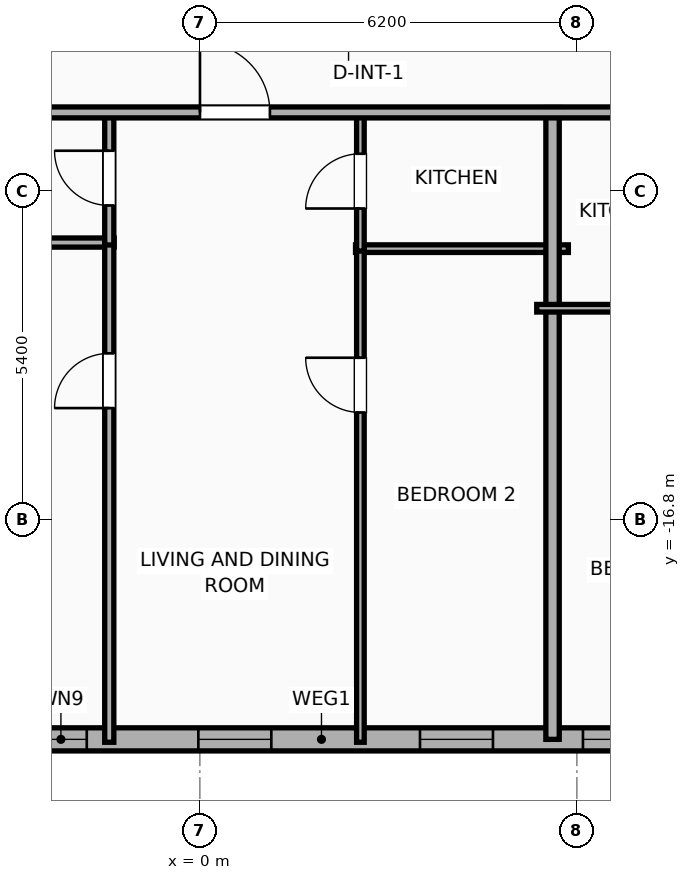
"""IFC4 building model, lengths in metres.
Left out: names, types, materials, properties, quantities, classifications, styles, units other than length and angle.
Written with IfcOpenShell. Run it as: python <this file> out.ifc"""

import sys

from ifc_helpers import new_model, si_unit, direction, frame, frame_2d, origin, place, context, subcontext, project, spatial, rectangle, extrude, element, fill, save


model = new_model("IFC4")
c1 = context("Model", 3, precision=1e-05, world=origin(), true_north=direction((0.0, 1.0)))
c2 = subcontext(c1, "Body", "Model", "MODEL_VIEW")
j1 = project(units=[si_unit("LENGTHUNIT", "METRE"), si_unit("PLANEANGLEUNIT", "RADIAN")], contexts=[c1])
p1 = place(None, origin())
s1 = spatial("IfcSite", under=j1, at=p1, CompositionType="ELEMENT")
p2 = place(p1, origin())
s2 = spatial("IfcBuilding", under=s1, at=p2, CompositionType="ELEMENT")
p3 = place(p2, frame((0.0, 0.0, 105.3)))
s3 = spatial("IfcBuildingStorey", under=s2, at=p3, CompositionType="ELEMENT", Elevation=105.3)
p4 = place(p3, frame((29.381, -20.41, 0.0), z_axis=(0.0, 0.0, 1.0), x_axis=(-1.0, 0.0, 0.0)))
e1 = element("IfcWall", 1, at=p4, inside=s3, PredefinedType="ELEMENTEDWALL", context=c2, shape_type="SweptSolid", body=[
    extrude(rectangle(XDim=54.763, YDim=0.38, at=frame_2d((27.381, 0.0))), origin(), (0.0, 0.0, 1.0), 3.65),
])
p5 = place(p4, frame((6.495, 0.0, 0.75)))
e2 = element("IfcOpeningElement", 2, at=p5, cuts=e1, PredefinedType="OPENING", context=c2, shape_type="SweptSolid", body=[
    extrude(rectangle(XDim=2.4, YDim=2.1, at=frame_2d((1.2, 1.05))), frame((0.0, 0.2, 0.0), z_axis=(0.0, -1.0, 0.0), x_axis=(1.0, 0.0, 0.0)), (0.0, 0.0, 1.0), 0.4),
])
p6 = place(p4, frame((17.686, 0.0, 0.75)))
e3 = element("IfcOpeningElement", 3, at=p6, cuts=e1, PredefinedType="OPENING", context=c2, shape_type="SweptSolid", body=[
    extrude(rectangle(XDim=2.4, YDim=2.1, at=frame_2d((1.2, 1.05))), frame((0.0, 0.2, 0.0), z_axis=(0.0, -1.0, 0.0), x_axis=(1.0, 0.0, 0.0)), (0.0, 0.0, 1.0), 0.4),
])
p7 = place(p4, frame((34.677, 0.0, 0.75)))
e4 = element("IfcOpeningElement", 4, at=p7, cuts=e1, PredefinedType="OPENING", context=c2, shape_type="SweptSolid", body=[
    extrude(rectangle(XDim=2.4, YDim=2.1, at=frame_2d((1.2, 1.05))), frame((0.0, 0.2, 0.0), z_axis=(0.0, -1.0, 0.0), x_axis=(1.0, 0.0, 0.0)), (0.0, 0.0, 1.0), 0.4),
])
p8 = place(p4, frame((45.867, 0.0, 0.75)))
e5 = element("IfcOpeningElement", 5, at=p8, cuts=e1, PredefinedType="OPENING", context=c2, shape_type="SweptSolid", body=[
    extrude(rectangle(XDim=2.4, YDim=2.1, at=frame_2d((1.2, 1.05))), frame((0.0, 0.2, 0.0), z_axis=(0.0, -1.0, 0.0), x_axis=(1.0, 0.0, 0.0)), (0.0, 0.0, 1.0), 0.4),
])
p9 = place(p4, frame((52.281, 0.0, 0.75)))
e6 = element("IfcOpeningElement", 6, at=p9, cuts=e1, PredefinedType="OPENING", context=c2, shape_type="SweptSolid", body=[
    extrude(rectangle(XDim=1.2, YDim=2.05, at=frame_2d((0.6, 1.025))), frame((0.0, 0.2, 0.0), z_axis=(0.0, -1.0, 0.0), x_axis=(1.0, 0.0, 0.0)), (0.0, 0.0, 1.0), 0.4),
])
p10 = place(p4, frame((49.641, 0.0, 0.75)))
e7 = element("IfcOpeningElement", 7, at=p10, cuts=e1, PredefinedType="OPENING", context=c2, shape_type="SweptSolid", body=[
    extrude(rectangle(XDim=1.2, YDim=2.05, at=frame_2d((0.6, 1.025))), frame((0.0, 0.2, 0.0), z_axis=(0.0, -1.0, 0.0), x_axis=(1.0, 0.0, 0.0)), (0.0, 0.0, 1.0), 0.4),
])
p11 = place(p4, frame((39.543, 0.0, 0.75)))
e8 = element("IfcOpeningElement", 8, at=p11, cuts=e1, PredefinedType="OPENING", context=c2, shape_type="SweptSolid", body=[
    extrude(rectangle(XDim=1.2, YDim=2.05, at=frame_2d((0.6, 1.025))), frame((0.0, 0.2, 0.0), z_axis=(0.0, -1.0, 0.0), x_axis=(1.0, 0.0, 0.0)), (0.0, 0.0, 1.0), 0.4),
])
p12 = place(p4, frame((44.538, 0.0, 0.75)))
e9 = element("IfcOpeningElement", 9, at=p12, cuts=e1, PredefinedType="OPENING", context=c2, shape_type="SweptSolid", body=[
    extrude(rectangle(XDim=0.52, YDim=2.05, at=frame_2d((0.26, 1.025))), frame((0.0, 0.2, 0.0), z_axis=(0.0, -1.0, 0.0), x_axis=(1.0, 0.0, 0.0)), (0.0, 0.0, 1.0), 0.4),
])
p13 = place(p4, frame((28.206, 0.0, 0.75)))
e10 = element("IfcOpeningElement", 10, at=p13, cuts=e1, PredefinedType="OPENING", context=c2, shape_type="SweptSolid", body=[
    extrude(rectangle(XDim=1.2, YDim=2.05, at=frame_2d((0.6, 1.025))), frame((0.0, 0.2, 0.0), z_axis=(0.0, -1.0, 0.0), x_axis=(1.0, 0.0, 0.0)), (0.0, 0.0, 1.0), 0.4),
])
p14 = place(p4, frame((31.241, 0.0, 0.75)))
e11 = element("IfcOpeningElement", 11, at=p14, cuts=e1, PredefinedType="OPENING", context=c2, shape_type="SweptSolid", body=[
    extrude(rectangle(XDim=0.85, YDim=2.05, at=frame_2d((0.425, 1.025))), frame((0.0, 0.2, 0.0), z_axis=(0.0, -1.0, 0.0), x_axis=(1.0, 0.0, 0.0)), (0.0, 0.0, 1.0), 0.4),
])
p15 = place(p4, frame((24.561, 0.0, 0.75)))
e12 = element("IfcOpeningElement", 12, at=p15, cuts=e1, PredefinedType="OPENING", context=c2, shape_type="SweptSolid", body=[
    extrude(rectangle(XDim=1.2, YDim=2.05, at=frame_2d((0.6, 1.025))), frame((0.0, 0.2, 0.0), z_axis=(0.0, -1.0, 0.0), x_axis=(1.0, 0.0, 0.0)), (0.0, 0.0, 1.0), 0.4),
])
p16 = place(p4, frame((22.561, 0.0, 0.75)))
e13 = element("IfcOpeningElement", 13, at=p16, cuts=e1, PredefinedType="OPENING", context=c2, shape_type="SweptSolid", body=[
    extrude(rectangle(XDim=0.52, YDim=2.05, at=frame_2d((0.26, 1.025))), frame((0.0, 0.2, 0.0), z_axis=(0.0, -1.0, 0.0), x_axis=(1.0, 0.0, 0.0)), (0.0, 0.0, 1.0), 0.4),
])
p17 = place(p4, frame((13.886, 0.0, 0.75)))
e14 = element("IfcOpeningElement", 14, at=p17, cuts=e1, PredefinedType="OPENING", context=c2, shape_type="SweptSolid", body=[
    extrude(rectangle(XDim=1.2, YDim=2.05, at=frame_2d((0.6, 1.025))), frame((0.0, 0.2, 0.0), z_axis=(0.0, -1.0, 0.0), x_axis=(1.0, 0.0, 0.0)), (0.0, 0.0, 1.0), 0.4),
])
p18 = place(p4, frame((11.694, 0.0, 0.75)))
e15 = element("IfcOpeningElement", 15, at=p18, cuts=e1, PredefinedType="OPENING", context=c2, shape_type="SweptSolid", body=[
    extrude(rectangle(XDim=0.85, YDim=2.05, at=frame_2d((0.425, 1.025))), frame((0.0, 0.2, 0.0), z_axis=(0.0, -1.0, 0.0), x_axis=(1.0, 0.0, 0.0)), (0.0, 0.0, 1.0), 0.4),
])
p19 = place(p4, frame((3.286, 0.0, 0.75)))
e16 = element("IfcOpeningElement", 16, at=p19, cuts=e1, PredefinedType="OPENING", context=c2, shape_type="SweptSolid", body=[
    extrude(rectangle(XDim=1.2, YDim=2.05, at=frame_2d((0.6, 1.025))), frame((0.0, 0.2, 0.0), z_axis=(0.0, -1.0, 0.0), x_axis=(1.0, 0.0, 0.0)), (0.0, 0.0, 1.0), 0.4),
])
p20 = place(p4, frame((0.816, 0.0, 0.75)))
e17 = element("IfcOpeningElement", 17, at=p20, cuts=e1, PredefinedType="OPENING", context=c2, shape_type="SweptSolid", body=[
    extrude(rectangle(XDim=1.2, YDim=2.05, at=frame_2d((0.6, 1.025))), frame((0.0, 0.2, 0.0), z_axis=(0.0, -1.0, 0.0), x_axis=(1.0, 0.0, 0.0)), (0.0, 0.0, 1.0), 0.4),
])
p21 = place(p3, frame((-5.26, -12.24, 0.0), z_axis=(0.0, 0.0, 1.0), x_axis=(1.0, 0.0, 0.0)))
e18 = element("IfcWall", 18, at=p21, inside=s3, PredefinedType="PLUMBINGWALL", context=c2, shape_type="SweptSolid", body=[
    extrude(rectangle(XDim=3.85, YDim=0.15, at=frame_2d((1.925, 0.0))), origin(), (0.0, 0.0, 1.0), 3.65),
])
p22 = place(p3, frame((2.56, -12.34, 0.0), z_axis=(0.0, 0.0, 1.0), x_axis=(1.0, 0.0, 0.0)))
e19 = element("IfcWall", 19, at=p22, inside=s3, PredefinedType="PARTITIONING", context=c2, shape_type="SweptSolid", body=[
    extrude(rectangle(XDim=3.5, YDim=0.125, at=frame_2d((1.75, 0.0))), origin(), (0.0, 0.0, 1.0), 3.65),
])
p23 = place(p3, frame((-1.49, -20.458, 0.0), z_axis=(0.0, 0.0, 1.0), x_axis=(0.0, 1.0, 0.0)))
e20 = element("IfcWall", 20, at=p23, inside=s3, PredefinedType="PLUMBINGWALL", context=c2, shape_type="SweptSolid", body=[
    extrude(rectangle(XDim=8.258, YDim=0.15, at=frame_2d((4.129, 0.0))), origin(), (0.0, 0.0, 1.0), 3.65),
])
p24 = place(p23, frame((5.496, 0.0, 0.0)))
e21 = element("IfcOpeningElement", 21, at=p24, cuts=e20, PredefinedType="OPENING", context=c2, shape_type="SweptSolid", body=[
    extrude(rectangle(XDim=0.9, YDim=2.05, at=frame_2d((0.45, 1.025))), frame((0.0, 0.085, 0.0), z_axis=(0.0, -1.0, 0.0), x_axis=(1.0, 0.0, 0.0)), (0.0, 0.0, 1.0), 0.17),
])
p25 = place(p3, frame((-1.49, -12.28, 0.0), z_axis=(0.0, 0.0, 1.0), x_axis=(0.0, 1.0, 0.0)))
e22 = element("IfcWall", 22, at=p25, inside=s3, PredefinedType="PLUMBINGWALL", context=c2, shape_type="SweptSolid", body=[
    extrude(rectangle(XDim=2.2, YDim=0.15, at=frame_2d((1.1, 0.0))), origin(), (0.0, 0.0, 1.0), 3.65),
])
p26 = place(p25, frame((0.65, 0.0, 0.0)))
e23 = element("IfcOpeningElement", 23, at=p26, cuts=e22, PredefinedType="OPENING", context=c2, shape_type="SweptSolid", body=[
    extrude(rectangle(XDim=0.9, YDim=2.05, at=frame_2d((0.45, 1.025))), frame((0.0, 0.085, 0.0), z_axis=(0.0, -1.0, 0.0), x_axis=(1.0, 0.0, 0.0)), (0.0, 0.0, 1.0), 0.17),
])
p27 = place(p3, frame((2.64, -20.458, 0.0), z_axis=(0.0, 0.0, 1.0), x_axis=(0.0, 1.0, 0.0)))
e24 = element("IfcWall", 24, at=p27, inside=s3, PredefinedType="PARTITIONING", context=c2, shape_type="SweptSolid", body=[
    extrude(rectangle(XDim=8.157, YDim=0.125, at=frame_2d((4.079, 0.0))), origin(), (0.0, 0.0, 1.0), 3.65),
])
p28 = place(p27, frame((5.424, 0.0, 0.0)))
e25 = element("IfcOpeningElement", 25, at=p28, cuts=e24, PredefinedType="OPENING", context=c2, shape_type="SweptSolid", body=[
    extrude(rectangle(XDim=0.9, YDim=2.05, at=frame_2d((0.45, 1.025))), frame((0.0, 0.073, 0.0), z_axis=(0.0, -1.0, 0.0), x_axis=(1.0, 0.0, 0.0)), (0.0, 0.0, 1.0), 0.145),
])
p29 = place(p3, frame((2.64, -12.38, 0.0), z_axis=(0.0, 0.0, 1.0), x_axis=(0.0, 1.0, 0.0)))
e26 = element("IfcWall", 26, at=p29, inside=s3, PredefinedType="PARTITIONING", context=c2, shape_type="SweptSolid", body=[
    extrude(rectangle(XDim=2.3, YDim=0.125, at=frame_2d((1.15, 0.0))), origin(), (0.0, 0.0, 1.0), 3.65),
])
p30 = place(p29, frame((0.7, 0.0, 0.0)))
e27 = element("IfcOpeningElement", 27, at=p30, cuts=e26, PredefinedType="OPENING", context=c2, shape_type="SweptSolid", body=[
    extrude(rectangle(XDim=0.9, YDim=2.05, at=frame_2d((0.45, 1.025))), frame((0.0, 0.073, 0.0), z_axis=(0.0, -1.0, 0.0), x_axis=(1.0, 0.0, 0.0)), (0.0, 0.0, 1.0), 0.145),
])
p31 = place(p3, frame((5.8, -20.41, 0.0), z_axis=(0.0, 0.0, 1.0), x_axis=(0.0, 1.0, 0.0)))
e28 = element("IfcWall", 28, at=p31, inside=s3, PredefinedType="PARTITIONING", context=c2, shape_type="SweptSolid", body=[
    extrude(rectangle(XDim=10.39, YDim=0.22, at=frame_2d((5.195, 0.0))), origin(), (0.0, 0.0, 1.0), 3.04),
])
p32 = place(p3, frame((5.54, -13.32, 0.0), z_axis=(0.0, 0.0, 1.0), x_axis=(1.0, 0.0, 0.0)))
e29 = element("IfcWall", 29, at=p32, inside=s3, PredefinedType="PARTITIONING", context=c2, shape_type="SweptSolid", body=[
    extrude(rectangle(XDim=3.58, YDim=0.125, at=frame_2d((1.79, 0.0))), origin(), (0.0, 0.0, 1.0), 3.65),
])
p33 = place(p3, frame((-29.21, -10.1, 0.0), z_axis=(0.0, 0.0, 1.0), x_axis=(1.0, 0.0, 0.0)))
e30 = element("IfcWall", 30, at=p33, inside=s3, PredefinedType="PARTITIONING", context=c2, shape_type="SweptSolid", body=[
    extrude(rectangle(XDim=62.42, YDim=0.18, at=frame_2d((31.21, 0.0))), origin(), (0.0, 0.0, 1.0), 3.65),
])
p34 = place(p33, frame((3.033, 0.0, 0.0)))
e31 = element("IfcOpeningElement", 31, at=p34, cuts=e30, PredefinedType="OPENING", context=c2, shape_type="SweptSolid", body=[
    extrude(rectangle(XDim=0.9, YDim=2.05, at=frame_2d((0.45, 1.025))), frame((0.0, 0.1, 0.0), z_axis=(0.0, -1.0, 0.0), x_axis=(1.0, 0.0, 0.0)), (0.0, 0.0, 1.0), 0.2),
])
p35 = place(p33, frame((9.768, 0.0, 0.0)))
e32 = element("IfcOpeningElement", 32, at=p35, cuts=e30, PredefinedType="OPENING", context=c2, shape_type="SweptSolid", body=[
    extrude(rectangle(XDim=0.9, YDim=2.05, at=frame_2d((0.45, 1.025))), frame((0.0, 0.1, 0.0), z_axis=(0.0, -1.0, 0.0), x_axis=(1.0, 0.0, 0.0)), (0.0, 0.0, 1.0), 0.2),
])
p36 = place(p33, frame((18.65, 0.0, 0.0)))
e33 = element("IfcOpeningElement", 33, at=p36, cuts=e30, PredefinedType="OPENING", context=c2, shape_type="SweptSolid", body=[
    extrude(rectangle(XDim=1.15, YDim=2.05, at=frame_2d((0.575, 1.025))), frame((0.0, 0.1, 0.0), z_axis=(0.0, -1.0, 0.0), x_axis=(1.0, 0.0, 0.0)), (0.0, 0.0, 1.0), 0.2),
])
p37 = place(p33, frame((29.212, 0.0, 0.0)))
e34 = element("IfcOpeningElement", 34, at=p37, cuts=e30, PredefinedType="OPENING", context=c2, shape_type="SweptSolid", body=[
    extrude(rectangle(XDim=1.15, YDim=2.05, at=frame_2d((0.575, 1.025))), frame((0.0, 0.1, 0.0), z_axis=(0.0, -1.0, 0.0), x_axis=(1.0, 0.0, 0.0)), (0.0, 0.0, 1.0), 0.2),
])
p38 = place(p33, frame((40.379, 0.0, 0.0)))
e35 = element("IfcOpeningElement", 35, at=p38, cuts=e30, PredefinedType="OPENING", context=c2, shape_type="SweptSolid", body=[
    extrude(rectangle(XDim=1.15, YDim=2.05, at=frame_2d((0.575, 1.025))), frame((0.0, 0.1, 0.0), z_axis=(0.0, -1.0, 0.0), x_axis=(1.0, 0.0, 0.0)), (0.0, 0.0, 1.0), 0.2),
])
p39 = place(p33, frame((50.959, 0.0, 0.0)))
e36 = element("IfcOpeningElement", 36, at=p39, cuts=e30, PredefinedType="OPENING", context=c2, shape_type="SweptSolid", body=[
    extrude(rectangle(XDim=1.15, YDim=2.05, at=frame_2d((0.575, 1.025))), frame((0.0, 0.1, 0.0), z_axis=(0.0, -1.0, 0.0), x_axis=(1.0, 0.0, 0.0)), (0.0, 0.0, 1.0), 0.2),
])
p40 = place(p33, frame((59.117, 0.0, 0.0)))
e37 = element("IfcOpeningElement", 37, at=p40, cuts=e30, PredefinedType="OPENING", context=c2, shape_type="SweptSolid", body=[
    extrude(rectangle(XDim=0.9, YDim=2.05, at=frame_2d((0.45, 1.025))), frame((0.0, 0.1, 0.0), z_axis=(0.0, -1.0, 0.0), x_axis=(1.0, 0.0, 0.0)), (0.0, 0.0, 1.0), 0.2),
])
p41 = place(p13, origin())
e38 = element("IfcWindow", 38, at=p41, inside=s3, PartitioningType="SINGLE_PANEL", PredefinedType="WINDOW", context=c2, shape_type="SweptSolid", body=[
    extrude(rectangle(XDim=1.2, YDim=2.05, at=frame_2d((0.6, 1.025))), frame((0.0, 0.03, 0.0), z_axis=(0.0, -1.0, 0.0), x_axis=(1.0, 0.0, 0.0)), (0.0, 0.0, 1.0), 0.06),
])
fill(e10, e38)
p42 = place(p14, origin())
e39 = element("IfcWindow", 39, at=p42, inside=s3, PartitioningType="SINGLE_PANEL", PredefinedType="WINDOW", context=c2, shape_type="SweptSolid", body=[
    extrude(rectangle(XDim=0.85, YDim=2.05, at=frame_2d((0.425, 1.025))), frame((0.0, 0.03, 0.0), z_axis=(0.0, -1.0, 0.0), x_axis=(1.0, 0.0, 0.0)), (0.0, 0.0, 1.0), 0.06),
])
fill(e11, e39)
p43 = place(p15, origin())
e40 = element("IfcWindow", 40, at=p43, inside=s3, PartitioningType="SINGLE_PANEL", PredefinedType="WINDOW", context=c2, shape_type="SweptSolid", body=[
    extrude(rectangle(XDim=1.2, YDim=2.05, at=frame_2d((0.6, 1.025))), frame((0.0, 0.03, 0.0), z_axis=(0.0, -1.0, 0.0), x_axis=(1.0, 0.0, 0.0)), (0.0, 0.0, 1.0), 0.06),
])
fill(e12, e40)
p44 = place(p16, origin())
e41 = element("IfcWindow", 41, at=p44, inside=s3, PartitioningType="SINGLE_PANEL", PredefinedType="WINDOW", context=c2, shape_type="SweptSolid", body=[
    extrude(rectangle(XDim=0.52, YDim=2.05, at=frame_2d((0.26, 1.025))), frame((0.0, 0.03, 0.0), z_axis=(0.0, -1.0, 0.0), x_axis=(1.0, 0.0, 0.0)), (0.0, 0.0, 1.0), 0.06),
])
fill(e13, e41)
p45 = place(p24, origin())
e42 = element("IfcDoor", 42, at=p45, inside=s3, OperationType="SINGLE_SWING_LEFT", PredefinedType="DOOR", context=c2, shape_type="SweptSolid", body=[
    extrude(rectangle(XDim=0.9, YDim=2.05, at=frame_2d((0.45, 1.025))), frame((0.0, 0.025, 0.0), z_axis=(0.0, -1.0, 0.0), x_axis=(1.0, 0.0, 0.0)), (0.0, 0.0, 1.0), 0.05),
])
fill(e21, e42)
p46 = place(p26, origin())
e43 = element("IfcDoor", 43, at=p46, inside=s3, OperationType="SINGLE_SWING_RIGHT", PredefinedType="DOOR", context=c2, shape_type="SweptSolid", body=[
    extrude(rectangle(XDim=0.9, YDim=2.05, at=frame_2d((0.45, 1.025))), frame((0.0, 0.025, 0.0), z_axis=(0.0, -1.0, 0.0), x_axis=(1.0, 0.0, 0.0)), (0.0, 0.0, 1.0), 0.05),
])
fill(e23, e43)
p47 = place(p28, origin())
e44 = element("IfcDoor", 44, at=p47, inside=s3, OperationType="SINGLE_SWING_RIGHT", PredefinedType="DOOR", context=c2, shape_type="SweptSolid", body=[
    extrude(rectangle(XDim=0.9, YDim=2.05, at=frame_2d((0.45, 1.025))), frame((0.0, 0.025, 0.0), z_axis=(0.0, -1.0, 0.0), x_axis=(1.0, 0.0, 0.0)), (0.0, 0.0, 1.0), 0.05),
])
fill(e25, e44)
p48 = place(p30, origin())
e45 = element("IfcDoor", 45, at=p48, inside=s3, OperationType="SINGLE_SWING_LEFT", PredefinedType="DOOR", context=c2, shape_type="SweptSolid", body=[
    extrude(rectangle(XDim=0.9, YDim=2.05, at=frame_2d((0.45, 1.025))), frame((0.0, 0.025, 0.0), z_axis=(0.0, -1.0, 0.0), x_axis=(1.0, 0.0, 0.0)), (0.0, 0.0, 1.0), 0.05),
])
fill(e27, e45)
p49 = place(p37, origin())
e46 = element("IfcDoor", 46, at=p49, inside=s3, OperationType="SINGLE_SWING_LEFT", PredefinedType="DOOR", context=c2, shape_type="SweptSolid", body=[
    extrude(rectangle(XDim=1.15, YDim=2.05, at=frame_2d((0.575, 1.025))), frame((0.0, 0.025, 0.0), z_axis=(0.0, -1.0, 0.0), x_axis=(1.0, 0.0, 0.0)), (0.0, 0.0, 1.0), 0.05),
])
fill(e34, e46)
save(model, sys.argv[1])
